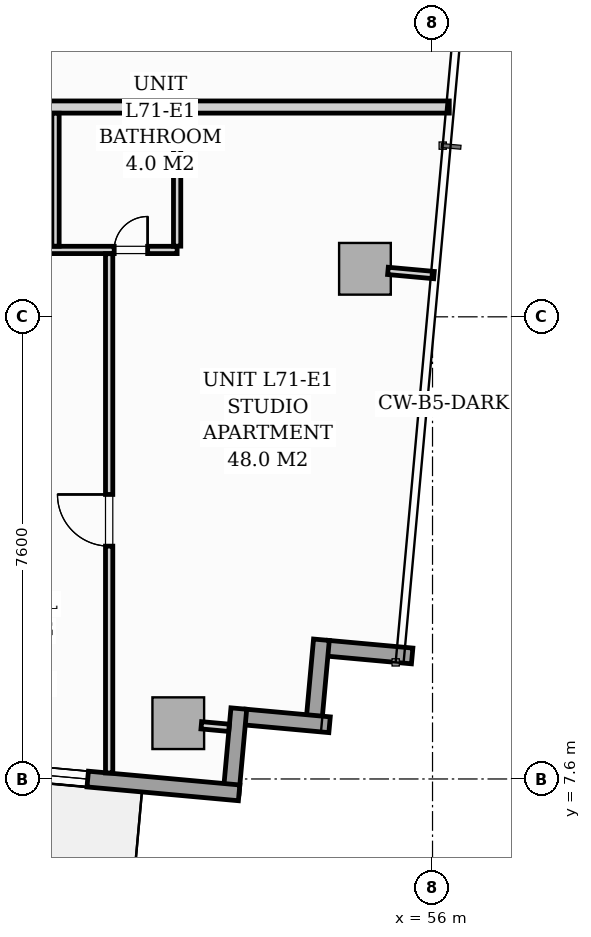
"""IFC4 building model, lengths in metres.
Left out: names, types, materials, properties, quantities, classifications, styles, units other than length and angle.
Written with IfcOpenShell. Run it as: python <this file> out.ifc"""

import sys

from ifc_helpers import new_model, si_unit, direction, frame, frame_2d, origin, origin_2d, place, context, subcontext, project, spatial, rectangle, extrude, source, transform, mapped, element, fill, save


model = new_model("IFC4")
c1 = context("Model", 3, precision=1e-05, world=origin(), true_north=direction((0.0, 1.0)))
c2 = subcontext(c1, "Body", "Model", "MODEL_VIEW")
j1 = project(units=[si_unit("LENGTHUNIT", "METRE"), si_unit("PLANEANGLEUNIT", "RADIAN")], contexts=[c1])
p1 = place(None, origin())
s1 = spatial("IfcSite", under=j1, at=p1, CompositionType="ELEMENT")
p2 = place(p1, origin())
s2 = spatial("IfcBuilding", under=s1, at=p2, CompositionType="ELEMENT")
p3 = place(p2, frame((0.0, 0.0, 246.3)))
s3 = spatial("IfcBuildingStorey", under=s2, at=p3, CompositionType="ELEMENT", Elevation=246.3)
m1 = source(origin(), c2, "Body", "SweptSolid", [
    extrude(rectangle(XDim=0.85, YDim=0.85, at=origin_2d()), origin(), (0.0, 0.0, 1.0), 3.296),
])
for number, where, z_axis, x_axis in (
    (1, (51.819, 8.517, 0.002), (0.0, 0.0, 1.0), (0.996, -0.091, 0.0)),
    (2, (54.889, 15.99, 0.002), (0.0, 0.0, 1.0), (0.996, -0.091, 0.0)),
):
    element("IfcColumn", number, at=place(p3, frame(where, z_axis=z_axis, x_axis=x_axis)), inside=s3, PredefinedType="COLUMN", context=c2, shape_type="MappedRepresentation", body=[
        mapped(m1, transform((0.0, 0.0, 0.0), scale=1.0)),
    ])
for number, where, z_axis, x_axis in (
    (3, (55.665, 9.623, 0.0), (0.0, 0.0, 1.0), (-0.996, 0.091, 0.0)),
    (4, (54.173, 9.889, 0.0), (0.0, 0.0, 1.0), (-0.091, -0.996, 0.0)),
):
    element("IfcWall", number, at=place(p3, frame(where, z_axis=z_axis, x_axis=x_axis)), inside=s3, PredefinedType="STANDARD", context=c2, shape_type="SweptSolid", body=[
        extrude(rectangle(XDim=1.395, YDim=0.26, at=frame_2d((0.698, 0.0))), origin(), (0.0, 0.0, 1.0), 3.04),
    ])
for number, where, z_axis, x_axis in (
    (5, (54.307, 8.492, 0.0), (0.0, 0.0, 1.0), (-0.996, 0.091, 0.0)),
    (6, (52.815, 8.758, 0.0), (0.0, 0.0, 1.0), (-0.091, -0.996, 0.0)),
):
    element("IfcWall", number, at=place(p3, frame(where, z_axis=z_axis, x_axis=x_axis)), inside=s3, PredefinedType="STANDARD", context=c2, shape_type="SweptSolid", body=[
        extrude(rectangle(XDim=1.395, YDim=0.26, at=frame_2d((0.698, 0.0))), origin(), (0.0, 0.0, 1.0), 3.04),
    ])
p4 = place(p3, frame((52.819, 7.372, 0.0), z_axis=(0.0, 0.0, 1.0), x_axis=(-0.995884447498, 0.090632043071, 0.0)))
e7 = element("IfcWall", 7, at=p4, inside=s3, PredefinedType="STANDARD", context=c2, shape_type="SweptSolid", body=[
    extrude(rectangle(XDim=14.63, YDim=0.26, at=frame_2d((7.315, 0.0))), origin(), (0.0, 0.0, 1.0), 3.04),
])
p5 = place(p4, frame((7.113, 0.0, 0.0)))
e8 = element("IfcOpeningElement", 8, at=p5, cuts=e7, PredefinedType="OPENING", context=c2, shape_type="SweptSolid", body=[
    extrude(rectangle(XDim=1.8, YDim=2.06, at=frame_2d((0.9, 1.03))), frame((0.0, 0.14, 0.0), z_axis=(0.0, -1.0, 0.0), x_axis=(1.0, 0.0, 0.0)), (0.0, 0.0, 1.0), 0.28),
])
p6 = place(p4, frame((2.5, 0.0, 0.65)))
e9 = element("IfcOpeningElement", 9, at=p6, cuts=e7, PredefinedType="OPENING", context=c2, shape_type="SweptSolid", body=[
    extrude(rectangle(XDim=1.6, YDim=1.5, at=frame_2d((0.8, 0.75))), frame((0.0, 0.14, 0.0), z_axis=(0.0, -1.0, 0.0), x_axis=(1.0, 0.0, 0.0)), (0.0, 0.0, 1.0), 0.28),
])
p7 = place(p3, frame((47.532, 18.65, 0.0), z_axis=(0.0, 0.0, 1.0), x_axis=(1.0, 0.0, 0.0)))
e10 = element("IfcWall", 10, at=p7, inside=s3, PredefinedType="PARTITIONING", context=c2, shape_type="SweptSolid", body=[
    extrude(rectangle(XDim=8.743, YDim=0.2, at=frame_2d((4.372, 0.0))), origin(), (0.0, 0.0, 1.0), 3.04),
])
p8 = place(p3, frame((47.6, 16.3, 0.0), z_axis=(0.0, 0.0, 1.0), x_axis=(1.0, 0.0, 0.0)))
e11 = element("IfcWall", 11, at=p8, inside=s3, PredefinedType="PARTITIONING", context=c2, shape_type="SweptSolid", body=[
    extrude(rectangle(XDim=4.2, YDim=0.12, at=frame_2d((2.1, 0.0))), origin(), (0.0, 0.0, 1.0), 2.381),
])
p9 = place(p8, frame((0.675, 0.0, 0.0)))
e12 = element("IfcOpeningElement", 12, at=p9, cuts=e11, PredefinedType="OPENING", context=c2, shape_type="SweptSolid", body=[
    extrude(rectangle(XDim=0.85, YDim=2.05, at=frame_2d((0.425, 1.025))), frame((0.0, 0.07, 0.0), z_axis=(0.0, -1.0, 0.0), x_axis=(1.0, 0.0, 0.0)), (0.0, 0.0, 1.0), 0.14),
])
p10 = place(p8, frame((3.165, 0.0, 0.0)))
e13 = element("IfcOpeningElement", 13, at=p10, cuts=e11, PredefinedType="OPENING", context=c2, shape_type="SweptSolid", body=[
    extrude(rectangle(XDim=0.55, YDim=2.0, at=frame_2d((0.275, 1.0))), frame((0.0, 0.07, 0.0), z_axis=(0.0, -1.0, 0.0), x_axis=(1.0, 0.0, 0.0)), (0.0, 0.0, 1.0), 0.14),
])
for number, where, z_axis, x_axis in (
    (14, (49.8, 16.362, 0.0), (0.0, 0.0, 1.0), (0.0, 1.0, 0.0)),
    (15, (51.8, 16.362, 0.0), (0.0, 0.0, 1.0), (0.0, 1.0, 0.0)),
):
    element("IfcWall", number, at=place(p3, frame(where, z_axis=z_axis, x_axis=x_axis)), inside=s3, PredefinedType="PARTITIONING", context=c2, shape_type="SweptSolid", body=[
        extrude(rectangle(XDim=2.186, YDim=0.12, at=frame_2d((1.093, 0.0))), origin(), (0.0, 0.0, 1.0), 3.04),
    ])
p11 = place(p3, frame((50.682, 7.699, 0.0), z_axis=(0.0, 0.0, 1.0), x_axis=(0.0, 1.0, 0.0)))
e16 = element("IfcWall", 16, at=p11, inside=s3, PredefinedType="PARTITIONING", context=c2, shape_type="SweptSolid", body=[
    extrude(rectangle(XDim=8.539, YDim=0.12, at=frame_2d((4.27, 0.0))), origin(), (0.0, 0.0, 1.0), 3.04),
])
p12 = place(p11, frame((3.73, 0.0, 0.0)))
e17 = element("IfcOpeningElement", 17, at=p12, cuts=e16, PredefinedType="OPENING", context=c2, shape_type="SweptSolid", body=[
    extrude(rectangle(XDim=0.85, YDim=2.05, at=frame_2d((0.425, 1.025))), frame((0.0, 0.07, 0.0), z_axis=(0.0, -1.0, 0.0), x_axis=(1.0, 0.0, 0.0)), (0.0, 0.0, 1.0), 0.14),
])
p13 = place(p3, frame((52.197, 8.483, 0.0), z_axis=(0.0, 0.0, 1.0), x_axis=(0.995884462012, -0.090631883588, 0.0)))
e18 = element("IfcWall", 18, at=p13, inside=s3, PredefinedType="PARTITIONING", context=c2, shape_type="SweptSolid", body=[
    extrude(rectangle(XDim=0.458, YDim=0.12, at=frame_2d((0.229, 0.0))), origin(), (0.0, 0.0, 1.0), 3.04),
])
p14 = place(p3, frame((55.267, 15.955, 0.0), z_axis=(0.0, 0.0, 1.0), x_axis=(0.995887938321, -0.09059367697, 0.0)))
e19 = element("IfcWall", 19, at=p14, inside=s3, PredefinedType="PARTITIONING", context=c2, shape_type="SweptSolid", body=[
    extrude(rectangle(XDim=0.76, YDim=0.12, at=frame_2d((0.38, 0.0))), origin(), (0.0, 0.0, 1.0), 3.04),
])
m2 = source(origin(), c2, "Body", "SweptSolid", [
    extrude(rectangle(XDim=1.6, YDim=1.5, at=frame_2d((0.8, 0.75))), frame((0.0, 0.03, 0.0), z_axis=(0.0, -1.0, 0.0), x_axis=(1.0, 0.0, 0.0)), (0.0, 0.0, 1.0), 0.06),
])
p15 = place(p6, origin())
e20 = element("IfcWindow", 20, at=p15, inside=s3, PartitioningType="SINGLE_PANEL", PredefinedType="WINDOW", context=c2, shape_type="MappedRepresentation", body=[
    mapped(m2, transform((0.0, 0.0, 0.0), scale=1.0)),
])
fill(e9, e20)
m3 = source(origin(), c2, "Body", "SweptSolid", [
    extrude(rectangle(XDim=0.85, YDim=2.05, at=frame_2d((0.425, 1.025))), frame((0.0, 0.025, 0.0), z_axis=(0.0, -1.0, 0.0), x_axis=(1.0, 0.0, 0.0)), (0.0, 0.0, 1.0), 0.05),
])
p16 = place(p12, origin())
e21 = element("IfcDoor", 21, at=p16, inside=s3, OperationType="SINGLE_SWING_RIGHT", PredefinedType="DOOR", context=c2, shape_type="MappedRepresentation", body=[
    mapped(m3, transform((0.0, 0.0, 0.0), scale=1.0)),
])
fill(e17, e21)
m4 = source(origin(), c2, "Body", "SweptSolid", [
    extrude(rectangle(XDim=0.55, YDim=2.0, at=frame_2d((0.275, 1.0))), frame((0.0, 0.025, 0.0), z_axis=(0.0, -1.0, 0.0), x_axis=(1.0, 0.0, 0.0)), (0.0, 0.0, 1.0), 0.05),
])
p17 = place(p10, origin())
e22 = element("IfcDoor", 22, at=p17, inside=s3, OperationType="SINGLE_SWING_RIGHT", PredefinedType="DOOR", context=c2, shape_type="MappedRepresentation", body=[
    mapped(m4, transform((0.0, 0.0, 0.0), scale=1.0)),
])
fill(e13, e22)
save(model, sys.argv[1])
